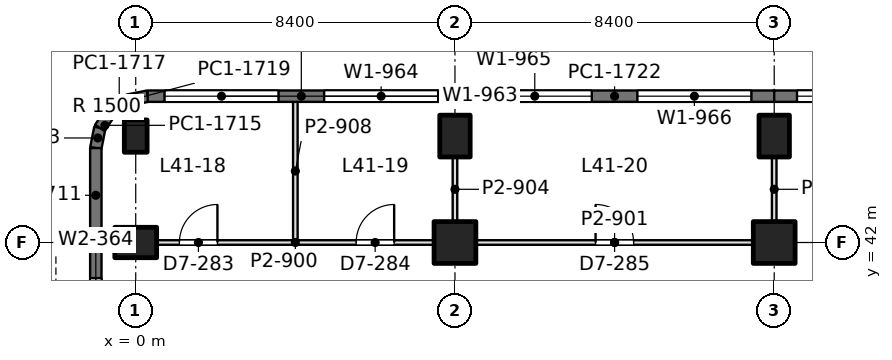
"""IFC4 building model, lengths in metres.
Left out: names, types, materials, properties, quantities, classifications, styles, units other than length and angle.
Written with IfcOpenShell. Run it as: python <this file> out.ifc"""

import sys

from ifc_helpers import new_model, si_unit, direction, frame, frame_2d, origin, origin_2d, place, context, subcontext, project, spatial, rectangle, extrude, element, fill, save


model = new_model("IFC4")
c1 = context("Model", 3, precision=1e-05, world=origin(), true_north=direction((0.0, 1.0)))
c2 = subcontext(c1, "Body", "Model", "MODEL_VIEW")
j1 = project(units=[si_unit("LENGTHUNIT", "METRE"), si_unit("PLANEANGLEUNIT", "RADIAN")], contexts=[c1])
p1 = place(None, origin())
s1 = spatial("IfcSite", under=j1, at=p1, CompositionType="ELEMENT")
p2 = place(p1, origin())
s2 = spatial("IfcBuilding", under=s1, at=p2, CompositionType="ELEMENT")
p3 = place(p2, frame((0.0, 0.0, 181.8)))
s3 = spatial("IfcBuildingStorey", under=s2, at=p3, CompositionType="ELEMENT", Elevation=181.8)
p4 = place(p3, frame((0.0, 42.0, 0.0), z_axis=(0.0, 0.0, 1.0), x_axis=(0.0, 1.0, 0.0)))
e1 = element("IfcColumn", 1, at=p4, inside=s3, PredefinedType="COLUMN", context=c2, shape_type="SweptSolid", body=[
    extrude(rectangle(XDim=0.8, YDim=1.1, at=origin_2d()), origin(), (0.0, 0.0, 1.0), 4.2),
])
p5 = place(p3, frame((0.0, 44.8, 0.0), z_axis=(0.0, 0.0, 1.0), x_axis=(1.0, 0.0, 0.0)))
e2 = element("IfcColumn", 2, at=p5, inside=s3, PredefinedType="COLUMN", context=c2, shape_type="SweptSolid", body=[
    extrude(rectangle(XDim=0.6, YDim=0.85, at=origin_2d()), origin(), (0.0, 0.0, 1.0), 4.2),
])
p6 = place(p3, frame((8.4, 42.0, 0.0), z_axis=(0.0, 0.0, 1.0), x_axis=(1.0, 0.0, 0.0)))
e3 = element("IfcColumn", 3, at=p6, inside=s3, PredefinedType="COLUMN", context=c2, shape_type="SweptSolid", body=[
    extrude(rectangle(XDim=1.1, YDim=1.1, at=origin_2d()), origin(), (0.0, 0.0, 1.0), 4.2),
])
p7 = place(p3, frame((8.4, 44.8, 0.0), z_axis=(0.0, 0.0, 1.0), x_axis=(1.0, 0.0, 0.0)))
e4 = element("IfcColumn", 4, at=p7, inside=s3, PredefinedType="COLUMN", context=c2, shape_type="SweptSolid", body=[
    extrude(rectangle(XDim=0.8, YDim=1.1, at=origin_2d()), origin(), (0.0, 0.0, 1.0), 4.2),
])
p8 = place(p3, frame((16.8, 42.0, 0.0), z_axis=(0.0, 0.0, 1.0), x_axis=(1.0, 0.0, 0.0)))
e5 = element("IfcColumn", 5, at=p8, inside=s3, PredefinedType="COLUMN", context=c2, shape_type="SweptSolid", body=[
    extrude(rectangle(XDim=1.1, YDim=1.1, at=origin_2d()), origin(), (0.0, 0.0, 1.0), 4.2),
])
p9 = place(p3, frame((16.8, 44.8, 0.0), z_axis=(0.0, 0.0, 1.0), x_axis=(1.0, 0.0, 0.0)))
e6 = element("IfcColumn", 6, at=p9, inside=s3, PredefinedType="COLUMN", context=c2, shape_type="SweptSolid", body=[
    extrude(rectangle(XDim=0.8, YDim=1.1, at=origin_2d()), origin(), (0.0, 0.0, 1.0), 4.2),
])
p10 = place(p3, frame((-1.05, 37.725, 0.0), z_axis=(0.0, 0.0, 1.0), x_axis=(0.0, 1.0, 0.0)))
e7 = element("IfcWall", 7, at=p10, inside=s3, PredefinedType="SOLIDWALL", context=c2, shape_type="SweptSolid", body=[
    extrude(rectangle(XDim=4.275, YDim=0.3, at=frame_2d((2.137, 0.0))), origin(), (0.0, 0.0, 1.0), 4.05),
])
p11 = place(p10, frame((0.938, 0.0, 0.9)))
e8 = element("IfcOpeningElement", 8, at=p11, cuts=e7, PredefinedType="OPENING", context=c2, shape_type="SweptSolid", body=[
    extrude(rectangle(XDim=2.4, YDim=1.9, at=frame_2d((1.2, 0.95))), frame((0.0, 0.16, 0.0), z_axis=(0.0, -1.0, 0.0), x_axis=(1.0, 0.0, 0.0)), (0.0, 0.0, 1.0), 0.32),
])
p12 = place(p3, frame((-1.05, 42.0, 0.0), z_axis=(0.0, 0.0, 1.0), x_axis=(0.0, 1.0, 0.0)))
e9 = element("IfcWall", 9, at=p12, inside=s3, PredefinedType="SOLIDWALL", context=c2, shape_type="SweptSolid", body=[
    extrude(rectangle(XDim=2.485, YDim=0.3, at=frame_2d((1.243, 0.0))), origin(), (0.0, 0.0, 1.0), 4.05),
])
p13 = place(p3, frame((-1.05, 44.485, 0.0), z_axis=(0.0, 0.0, 1.0), x_axis=(0.195073962632, 0.980788534345, 0.0)))
e10 = element("IfcWall", 10, at=p13, inside=s3, PredefinedType="SOLIDWALL", context=c2, shape_type="SweptSolid", body=[
    extrude(rectangle(XDim=0.541, YDim=0.3, at=frame_2d((0.271, 0.0))), origin(), (0.0, 0.0, 1.0), 4.05),
])
p14 = place(p3, frame((-0.945, 45.015, 0.0), z_axis=(0.0, 0.0, 1.0), x_axis=(0.55534295404, 0.831621430339, 0.0)))
e11 = element("IfcWall", 11, at=p14, inside=s3, PredefinedType="SOLIDWALL", context=c2, shape_type="SweptSolid", body=[
    extrude(rectangle(XDim=0.526, YDim=0.3, at=frame_2d((0.263, 0.0))), origin(), (0.0, 0.0, 1.0), 4.05),
])
p15 = place(p3, frame((-0.653, 45.453, 0.0), z_axis=(0.0, 0.0, 1.0), x_axis=(0.831692711774, 0.555236195849, 0.0)))
e12 = element("IfcWall", 12, at=p15, inside=s3, PredefinedType="SOLIDWALL", context=c2, shape_type="SweptSolid", body=[
    extrude(rectangle(XDim=0.525, YDim=0.3, at=frame_2d((0.263, 0.0))), origin(), (0.0, 0.0, 1.0), 4.05),
])
p16 = place(p3, frame((-0.216, 45.744, 0.0), z_axis=(0.0, 0.0, 1.0), x_axis=(0.980702050465, 0.1955082817, 0.0)))
e13 = element("IfcWall", 13, at=p16, inside=s3, PredefinedType="SOLIDWALL", context=c2, shape_type="SweptSolid", body=[
    extrude(rectangle(XDim=0.541, YDim=0.3, at=frame_2d((0.271, 0.0))), origin(), (0.0, 0.0, 1.0), 4.05),
])
p17 = place(p3, frame((0.315, 45.85, 0.0), z_axis=(0.0, 0.0, 1.0), x_axis=(1.0, 0.0, 0.0)))
e14 = element("IfcWall", 14, at=p17, inside=s3, PredefinedType="SOLIDWALL", context=c2, shape_type="SweptSolid", body=[
    extrude(rectangle(XDim=8.085, YDim=0.3, at=frame_2d((4.042, 0.0))), origin(), (0.0, 0.0, 1.0), 4.05),
])
p18 = place(p17, frame((0.443, 0.0, 0.9)))
e15 = element("IfcOpeningElement", 15, at=p18, cuts=e14, PredefinedType="OPENING", context=c2, shape_type="SweptSolid", body=[
    extrude(rectangle(XDim=3.0, YDim=1.9, at=frame_2d((1.5, 0.95))), frame((0.0, 0.16, 0.0), z_axis=(0.0, -1.0, 0.0), x_axis=(1.0, 0.0, 0.0)), (0.0, 0.0, 1.0), 0.32),
])
p19 = place(p17, frame((4.643, 0.0, 0.9)))
e16 = element("IfcOpeningElement", 16, at=p19, cuts=e14, PredefinedType="OPENING", context=c2, shape_type="SweptSolid", body=[
    extrude(rectangle(XDim=3.0, YDim=1.9, at=frame_2d((1.5, 0.95))), frame((0.0, 0.16, 0.0), z_axis=(0.0, -1.0, 0.0), x_axis=(1.0, 0.0, 0.0)), (0.0, 0.0, 1.0), 0.32),
])
p20 = place(p3, frame((8.4, 45.85, 0.0), z_axis=(0.0, 0.0, 1.0), x_axis=(1.0, 0.0, 0.0)))
e17 = element("IfcWall", 17, at=p20, inside=s3, PredefinedType="SOLIDWALL", context=c2, shape_type="SweptSolid", body=[
    extrude(rectangle(XDim=8.4, YDim=0.3, at=frame_2d((4.2, 0.0))), origin(), (0.0, 0.0, 1.0), 4.05),
])
p21 = place(p20, frame((0.6, 0.0, 0.9)))
e18 = element("IfcOpeningElement", 18, at=p21, cuts=e17, PredefinedType="OPENING", context=c2, shape_type="SweptSolid", body=[
    extrude(rectangle(XDim=3.0, YDim=1.9, at=frame_2d((1.5, 0.95))), frame((0.0, 0.16, 0.0), z_axis=(0.0, -1.0, 0.0), x_axis=(1.0, 0.0, 0.0)), (0.0, 0.0, 1.0), 0.32),
])
p22 = place(p20, frame((4.8, 0.0, 0.9)))
e19 = element("IfcOpeningElement", 19, at=p22, cuts=e17, PredefinedType="OPENING", context=c2, shape_type="SweptSolid", body=[
    extrude(rectangle(XDim=3.0, YDim=1.9, at=frame_2d((1.5, 0.95))), frame((0.0, 0.16, 0.0), z_axis=(0.0, -1.0, 0.0), x_axis=(1.0, 0.0, 0.0)), (0.0, 0.0, 1.0), 0.32),
])
p23 = place(p3, frame((16.8, 45.85, 0.0), z_axis=(0.0, 0.0, 1.0), x_axis=(1.0, 0.0, 0.0)))
e20 = element("IfcWall", 20, at=p23, inside=s3, PredefinedType="SOLIDWALL", context=c2, shape_type="SweptSolid", body=[
    extrude(rectangle(XDim=8.4, YDim=0.3, at=frame_2d((4.2, 0.0))), origin(), (0.0, 0.0, 1.0), 4.05),
])
p24 = place(p23, frame((0.6, 0.0, 0.9)))
e21 = element("IfcOpeningElement", 21, at=p24, cuts=e20, PredefinedType="OPENING", context=c2, shape_type="SweptSolid", body=[
    extrude(rectangle(XDim=3.0, YDim=1.9, at=frame_2d((1.5, 0.95))), frame((0.0, 0.16, 0.0), z_axis=(0.0, -1.0, 0.0), x_axis=(1.0, 0.0, 0.0)), (0.0, 0.0, 1.0), 0.32),
])
p25 = place(p23, frame((4.8, 0.0, 0.9)))
e22 = element("IfcOpeningElement", 22, at=p25, cuts=e20, PredefinedType="OPENING", context=c2, shape_type="SweptSolid", body=[
    extrude(rectangle(XDim=3.0, YDim=1.9, at=frame_2d((1.5, 0.95))), frame((0.0, 0.16, 0.0), z_axis=(0.0, -1.0, 0.0), x_axis=(1.0, 0.0, 0.0)), (0.0, 0.0, 1.0), 0.32),
])
p26 = place(p3, frame((0.549, 42.0, 0.0), z_axis=(0.0, 0.0, 1.0), x_axis=(1.0, 0.0, 0.0)))
e23 = element("IfcWall", 23, at=p26, inside=s3, PredefinedType="PARTITIONING", context=c2, shape_type="SweptSolid", body=[
    extrude(rectangle(XDim=7.302, YDim=0.12, at=frame_2d((3.651, 0.0))), origin(), (0.0, 0.0, 1.0), 3.55),
])
p27 = place(p26, frame((0.601, 0.0, 0.0)))
e24 = element("IfcOpeningElement", 24, at=p27, cuts=e23, PredefinedType="OPENING", context=c2, shape_type="SweptSolid", body=[
    extrude(rectangle(XDim=1.0, YDim=2.4, at=frame_2d((0.5, 1.2))), frame((0.0, 0.07, 0.0), z_axis=(0.0, -1.0, 0.0), x_axis=(1.0, 0.0, 0.0)), (0.0, 0.0, 1.0), 0.14),
])
p28 = place(p26, frame((5.251, 0.0, 0.0)))
e25 = element("IfcOpeningElement", 25, at=p28, cuts=e23, PredefinedType="OPENING", context=c2, shape_type="SweptSolid", body=[
    extrude(rectangle(XDim=1.0, YDim=2.4, at=frame_2d((0.5, 1.2))), frame((0.0, 0.07, 0.0), z_axis=(0.0, -1.0, 0.0), x_axis=(1.0, 0.0, 0.0)), (0.0, 0.0, 1.0), 0.14),
])
p29 = place(p3, frame((8.949, 42.0, 0.0), z_axis=(0.0, 0.0, 1.0), x_axis=(1.0, 0.0, 0.0)))
e26 = element("IfcWall", 26, at=p29, inside=s3, PredefinedType="PARTITIONING", context=c2, shape_type="SweptSolid", body=[
    extrude(rectangle(XDim=7.302, YDim=0.12, at=frame_2d((3.651, 0.0))), origin(), (0.0, 0.0, 1.0), 3.55),
])
p30 = place(p29, frame((3.151, 0.0, 0.0)))
e27 = element("IfcOpeningElement", 27, at=p30, cuts=e26, PredefinedType="OPENING", context=c2, shape_type="SweptSolid", body=[
    extrude(rectangle(XDim=1.0, YDim=2.4, at=frame_2d((0.5, 1.2))), frame((0.0, 0.07, 0.0), z_axis=(0.0, -1.0, 0.0), x_axis=(1.0, 0.0, 0.0)), (0.0, 0.0, 1.0), 0.14),
])
p31 = place(p3, frame((4.2, 42.058, 0.0), z_axis=(0.0, 0.0, 1.0), x_axis=(0.0, 1.0, 0.0)))
e28 = element("IfcWall", 28, at=p31, inside=s3, PredefinedType="PARTITIONING", context=c2, shape_type="SweptSolid", body=[
    extrude(rectangle(XDim=3.644, YDim=0.12, at=frame_2d((1.822, 0.0))), origin(), (0.0, 0.0, 1.0), 3.55),
])
for number, where, z_axis, x_axis in (
    (29, (8.4, 42.549, 0.0), (0.0, 0.0, 1.0), (0.0, 1.0, 0.0)),
    (30, (16.8, 42.549, 0.0), (0.0, 0.0, 1.0), (0.0, 1.0, 0.0)),
):
    element("IfcWall", number, at=place(p3, frame(where, z_axis=z_axis, x_axis=x_axis)), inside=s3, PredefinedType="PARTITIONING", context=c2, shape_type="SweptSolid", body=[
        extrude(rectangle(XDim=1.702, YDim=0.12, at=frame_2d((0.851, 0.0))), origin(), (0.0, 0.0, 1.0), 3.69),
    ])
p32 = place(p11, origin())
e31 = element("IfcWindow", 31, at=p32, inside=s3, PartitioningType="SINGLE_PANEL", PredefinedType="WINDOW", context=c2, shape_type="SweptSolid", body=[
    extrude(rectangle(XDim=2.4, YDim=1.9, at=frame_2d((1.2, 0.95))), frame((0.0, 0.03, 0.0), z_axis=(0.0, -1.0, 0.0), x_axis=(1.0, 0.0, 0.0)), (0.0, 0.0, 1.0), 0.06),
])
fill(e8, e31)
p33 = place(p18, origin())
e32 = element("IfcWindow", 32, at=p33, inside=s3, PartitioningType="SINGLE_PANEL", PredefinedType="WINDOW", context=c2, shape_type="SweptSolid", body=[
    extrude(rectangle(XDim=3.0, YDim=1.9, at=frame_2d((1.5, 0.95))), frame((0.0, 0.03, 0.0), z_axis=(0.0, -1.0, 0.0), x_axis=(1.0, 0.0, 0.0)), (0.0, 0.0, 1.0), 0.06),
])
fill(e15, e32)
p34 = place(p19, origin())
e33 = element("IfcWindow", 33, at=p34, inside=s3, PartitioningType="SINGLE_PANEL", PredefinedType="WINDOW", context=c2, shape_type="SweptSolid", body=[
    extrude(rectangle(XDim=3.0, YDim=1.9, at=frame_2d((1.5, 0.95))), frame((0.0, 0.03, 0.0), z_axis=(0.0, -1.0, 0.0), x_axis=(1.0, 0.0, 0.0)), (0.0, 0.0, 1.0), 0.06),
])
fill(e16, e33)
p35 = place(p21, origin())
e34 = element("IfcWindow", 34, at=p35, inside=s3, PartitioningType="SINGLE_PANEL", PredefinedType="WINDOW", context=c2, shape_type="SweptSolid", body=[
    extrude(rectangle(XDim=3.0, YDim=1.9, at=frame_2d((1.5, 0.95))), frame((0.0, 0.03, 0.0), z_axis=(0.0, -1.0, 0.0), x_axis=(1.0, 0.0, 0.0)), (0.0, 0.0, 1.0), 0.06),
])
fill(e18, e34)
p36 = place(p22, origin())
e35 = element("IfcWindow", 35, at=p36, inside=s3, PartitioningType="SINGLE_PANEL", PredefinedType="WINDOW", context=c2, shape_type="SweptSolid", body=[
    extrude(rectangle(XDim=3.0, YDim=1.9, at=frame_2d((1.5, 0.95))), frame((0.0, 0.03, 0.0), z_axis=(0.0, -1.0, 0.0), x_axis=(1.0, 0.0, 0.0)), (0.0, 0.0, 1.0), 0.06),
])
fill(e19, e35)
p37 = place(p24, origin())
e36 = element("IfcWindow", 36, at=p37, inside=s3, PartitioningType="SINGLE_PANEL", PredefinedType="WINDOW", context=c2, shape_type="SweptSolid", body=[
    extrude(rectangle(XDim=3.0, YDim=1.9, at=frame_2d((1.5, 0.95))), frame((0.0, 0.03, 0.0), z_axis=(0.0, -1.0, 0.0), x_axis=(1.0, 0.0, 0.0)), (0.0, 0.0, 1.0), 0.06),
])
fill(e21, e36)
p38 = place(p27, origin())
e37 = element("IfcDoor", 37, at=p38, inside=s3, OperationType="SINGLE_SWING_RIGHT", PredefinedType="DOOR", context=c2, shape_type="SweptSolid", body=[
    extrude(rectangle(XDim=1.0, YDim=2.4, at=frame_2d((0.5, 1.2))), frame((0.0, 0.025, 0.0), z_axis=(0.0, -1.0, 0.0), x_axis=(1.0, 0.0, 0.0)), (0.0, 0.0, 1.0), 0.05),
])
fill(e24, e37)
p39 = place(p28, origin())
e38 = element("IfcDoor", 38, at=p39, inside=s3, OperationType="SINGLE_SWING_RIGHT", PredefinedType="DOOR", context=c2, shape_type="SweptSolid", body=[
    extrude(rectangle(XDim=1.0, YDim=2.4, at=frame_2d((0.5, 1.2))), frame((0.0, 0.025, 0.0), z_axis=(0.0, -1.0, 0.0), x_axis=(1.0, 0.0, 0.0)), (0.0, 0.0, 1.0), 0.05),
])
fill(e25, e38)
p40 = place(p30, origin())
e39 = element("IfcDoor", 39, at=p40, inside=s3, OperationType="SINGLE_SWING_LEFT", PredefinedType="DOOR", context=c2, shape_type="SweptSolid", body=[
    extrude(rectangle(XDim=1.0, YDim=2.4, at=frame_2d((0.5, 1.2))), frame((0.0, 0.025, 0.0), z_axis=(0.0, -1.0, 0.0), x_axis=(1.0, 0.0, 0.0)), (0.0, 0.0, 1.0), 0.05),
])
fill(e27, e39)
save(model, sys.argv[1])
